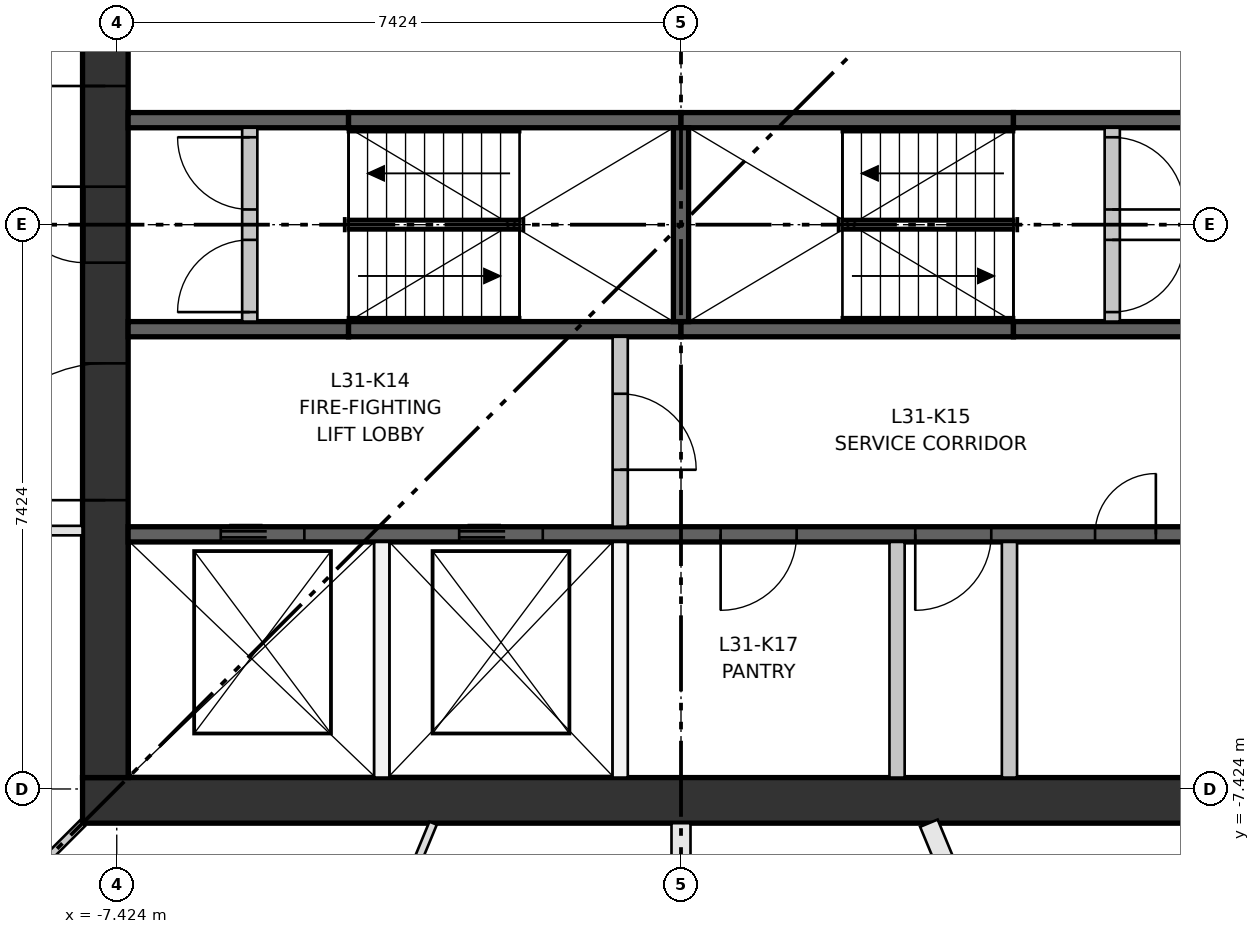
"""IFC4 building model, lengths in metres.
Left out: names, types, materials, properties, quantities, classifications, styles, units other than length and angle.
Written with IfcOpenShell. Run it as: python <this file> out.ifc"""

import sys

from ifc_helpers import new_model, si_unit, direction, frame, frame_2d, origin, place, context, subcontext, project, spatial, rectangle, extrude, element, fill, save


model = new_model("IFC4")
c1 = context("Model", 3, precision=1e-05, world=origin(), true_north=direction((0.0, 1.0)))
c2 = subcontext(c1, "Body", "Model", "MODEL_VIEW")
j1 = project(units=[si_unit("LENGTHUNIT", "METRE"), si_unit("PLANEANGLEUNIT", "RADIAN")], contexts=[c1])
p1 = place(None, origin())
s1 = spatial("IfcSite", under=j1, at=p1, CompositionType="ELEMENT")
p2 = place(p1, origin())
s2 = spatial("IfcBuilding", under=s1, at=p2, CompositionType="ELEMENT")
p3 = place(p2, frame((0.0, 0.0, 120.95)))
s3 = spatial("IfcBuildingStorey", under=s2, at=p3, CompositionType="ELEMENT", Elevation=120.95)
p4 = place(p3, frame((-7.874, -7.574, 0.0), z_axis=(0.0, 0.0, 1.0), x_axis=(1.0, 0.0, 0.0)))
e1 = element("IfcWall", 1, at=p4, inside=s3, PredefinedType="SHEAR", context=c2, shape_type="SweptSolid", body=[
    extrude(rectangle(XDim=15.748, YDim=0.6, at=frame_2d((7.874, 0.0))), origin(), (0.0, 0.0, 1.0), 3.35),
])
p5 = place(p3, frame((-7.574, -7.274, 0.0), z_axis=(0.0, 0.0, 1.0), x_axis=(0.0, 1.0, 0.0)))
e2 = element("IfcWall", 2, at=p5, inside=s3, PredefinedType="SHEAR", context=c2, shape_type="SweptSolid", body=[
    extrude(rectangle(XDim=14.548, YDim=0.6, at=frame_2d((7.274, 0.0))), origin(), (0.0, 0.0, 1.0), 3.35),
])
p6 = place(p5, frame((6.774, 0.0, 0.0)))
e3 = element("IfcOpeningElement", 3, at=p6, cuts=e2, PredefinedType="OPENING", context=c2, shape_type="SweptSolid", body=[
    extrude(rectangle(XDim=1.0, YDim=2.1, at=frame_2d((0.5, 1.05))), frame((0.0, 0.31, 0.0), z_axis=(0.0, -1.0, 0.0), x_axis=(1.0, 0.0, 0.0)), (0.0, 0.0, 1.0), 0.62),
])
p7 = place(p5, frame((3.649, 0.0, 0.0)))
e4 = element("IfcOpeningElement", 4, at=p7, cuts=e2, PredefinedType="OPENING", context=c2, shape_type="SweptSolid", body=[
    extrude(rectangle(XDim=1.8, YDim=2.1, at=frame_2d((0.9, 1.05))), frame((0.0, 0.31, 0.0), z_axis=(0.0, -1.0, 0.0), x_axis=(1.0, 0.0, 0.0)), (0.0, 0.0, 1.0), 0.62),
])
p8 = place(p5, frame((9.098, 0.0, 0.0)))
e5 = element("IfcOpeningElement", 5, at=p8, cuts=e2, PredefinedType="OPENING", context=c2, shape_type="SweptSolid", body=[
    extrude(rectangle(XDim=1.8, YDim=2.1, at=frame_2d((0.9, 1.05))), frame((0.0, 0.31, 0.0), z_axis=(0.0, -1.0, 0.0), x_axis=(1.0, 0.0, 0.0)), (0.0, 0.0, 1.0), 0.62),
])
p9 = place(p3, frame((-7.274, -4.074, 0.0), z_axis=(0.0, 0.0, 1.0), x_axis=(1.0, 0.0, 0.0)))
e6 = element("IfcWall", 6, at=p9, inside=s3, PredefinedType="SHEAR", context=c2, shape_type="SweptSolid", body=[
    extrude(rectangle(XDim=14.548, YDim=0.2, at=frame_2d((7.274, 0.0))), origin(), (0.0, 0.0, 1.0), 3.0),
])
p10 = place(p9, frame((1.219, 0.0, 0.0)))
e7 = element("IfcOpeningElement", 7, at=p10, cuts=e6, PredefinedType="OPENING", context=c2, shape_type="SweptSolid", body=[
    extrude(rectangle(XDim=1.1, YDim=2.1, at=frame_2d((0.55, 1.05))), frame((0.0, 0.11, 0.0), z_axis=(0.0, -1.0, 0.0), x_axis=(1.0, 0.0, 0.0)), (0.0, 0.0, 1.0), 0.22),
])
p11 = place(p9, frame((4.355, 0.0, 0.0)))
e8 = element("IfcOpeningElement", 8, at=p11, cuts=e6, PredefinedType="OPENING", context=c2, shape_type="SweptSolid", body=[
    extrude(rectangle(XDim=1.1, YDim=2.1, at=frame_2d((0.55, 1.05))), frame((0.0, 0.11, 0.0), z_axis=(0.0, -1.0, 0.0), x_axis=(1.0, 0.0, 0.0)), (0.0, 0.0, 1.0), 0.22),
])
p12 = place(p9, frame((7.795, 0.0, 0.0)))
e9 = element("IfcOpeningElement", 9, at=p12, cuts=e6, PredefinedType="OPENING", context=c2, shape_type="SweptSolid", body=[
    extrude(rectangle(XDim=1.0, YDim=2.1, at=frame_2d((0.5, 1.05))), frame((0.0, 0.11, 0.0), z_axis=(0.0, -1.0, 0.0), x_axis=(1.0, 0.0, 0.0)), (0.0, 0.0, 1.0), 0.22),
])
p13 = place(p9, frame((10.356, 0.0, 0.0)))
e10 = element("IfcOpeningElement", 10, at=p13, cuts=e6, PredefinedType="OPENING", context=c2, shape_type="SweptSolid", body=[
    extrude(rectangle(XDim=1.0, YDim=2.1, at=frame_2d((0.5, 1.05))), frame((0.0, 0.11, 0.0), z_axis=(0.0, -1.0, 0.0), x_axis=(1.0, 0.0, 0.0)), (0.0, 0.0, 1.0), 0.22),
])
p14 = place(p9, frame((12.722, 0.0, 0.0)))
e11 = element("IfcOpeningElement", 11, at=p14, cuts=e6, PredefinedType="OPENING", context=c2, shape_type="SweptSolid", body=[
    extrude(rectangle(XDim=0.8, YDim=2.1, at=frame_2d((0.4, 1.05))), frame((0.0, 0.11, 0.0), z_axis=(0.0, -1.0, 0.0), x_axis=(1.0, 0.0, 0.0)), (0.0, 0.0, 1.0), 0.22),
])
p15 = place(p3, frame((-7.274, -1.375, 0.0), z_axis=(0.0, 0.0, 1.0), x_axis=(1.0, 0.0, 0.0)))
e12 = element("IfcWall", 12, at=p15, inside=s3, PredefinedType="SHEAR", context=c2, shape_type="SweptSolid", body=[
    extrude(rectangle(XDim=2.9, YDim=0.2, at=frame_2d((1.45, 0.0))), origin(), (0.0, 0.0, 1.0), 3.0),
])
for number, where, z_axis, x_axis in (
    (13, (-4.374, -1.375, 0.0), (0.0, 0.0, 1.0), (1.0, 0.0, 0.0)),
    (14, (0.0, -1.375, 0.0), (0.0, 0.0, 1.0), (1.0, 0.0, 0.0)),
):
    element("IfcWall", number, at=place(p3, frame(where, z_axis=z_axis, x_axis=x_axis)), inside=s3, PredefinedType="SHEAR", context=c2, shape_type="SweptSolid", body=[
        extrude(rectangle(XDim=4.374, YDim=0.2, at=frame_2d((2.187, 0.0))), origin(), (0.0, 0.0, 1.0), 3.0),
    ])
for number, where, z_axis, x_axis in (
    (15, (4.374, -1.375, 0.0), (0.0, 0.0, 1.0), (1.0, 0.0, 0.0)),
    (16, (-7.274, 1.375, 0.0), (0.0, 0.0, 1.0), (1.0, 0.0, 0.0)),
):
    element("IfcWall", number, at=place(p3, frame(where, z_axis=z_axis, x_axis=x_axis)), inside=s3, PredefinedType="SHEAR", context=c2, shape_type="SweptSolid", body=[
        extrude(rectangle(XDim=2.9, YDim=0.2, at=frame_2d((1.45, 0.0))), origin(), (0.0, 0.0, 1.0), 3.0),
    ])
for number, where, z_axis, x_axis in (
    (17, (-4.374, 1.375, 0.0), (0.0, 0.0, 1.0), (1.0, 0.0, 0.0)),
    (18, (0.0, 1.375, 0.0), (0.0, 0.0, 1.0), (1.0, 0.0, 0.0)),
):
    element("IfcWall", number, at=place(p3, frame(where, z_axis=z_axis, x_axis=x_axis)), inside=s3, PredefinedType="SHEAR", context=c2, shape_type="SweptSolid", body=[
        extrude(rectangle(XDim=4.374, YDim=0.2, at=frame_2d((2.187, 0.0))), origin(), (0.0, 0.0, 1.0), 3.0),
    ])
p16 = place(p3, frame((4.374, 1.375, 0.0), z_axis=(0.0, 0.0, 1.0), x_axis=(1.0, 0.0, 0.0)))
e19 = element("IfcWall", 19, at=p16, inside=s3, PredefinedType="SHEAR", context=c2, shape_type="SweptSolid", body=[
    extrude(rectangle(XDim=2.9, YDim=0.2, at=frame_2d((1.45, 0.0))), origin(), (0.0, 0.0, 1.0), 3.0),
])
p17 = place(p3, frame((0.0, -1.275, 0.0), z_axis=(0.0, 0.0, 1.0), x_axis=(0.0, 1.0, 0.0)))
e20 = element("IfcWall", 20, at=p17, inside=s3, PredefinedType="SHEAR", context=c2, shape_type="SweptSolid", body=[
    extrude(rectangle(XDim=2.55, YDim=0.2, at=frame_2d((1.275, 0.0))), origin(), (0.0, 0.0, 1.0), 3.0),
])
for number, where, z_axis, x_axis in (
    (21, (-3.937, -7.274, 0.0), (0.0, 0.0, 1.0), (0.0, 1.0, 0.0)),
    (22, (-0.8, -7.274, 0.0), (0.0, 0.0, 1.0), (0.0, 1.0, 0.0)),
):
    element("IfcWall", number, at=place(p3, frame(where, z_axis=z_axis, x_axis=x_axis)), inside=s3, PredefinedType="PARTITIONING", context=c2, shape_type="SweptSolid", body=[
        extrude(rectangle(XDim=3.1, YDim=0.2, at=frame_2d((1.55, 0.0))), origin(), (0.0, 0.0, 1.0), 3.0),
    ])
p18 = place(p3, frame((-0.8, -3.974, 0.0), z_axis=(0.0, 0.0, 1.0), x_axis=(0.0, 1.0, 0.0)))
e23 = element("IfcWall", 23, at=p18, inside=s3, PredefinedType="PARTITIONING", context=c2, shape_type="SweptSolid", body=[
    extrude(rectangle(XDim=2.499, YDim=0.2, at=frame_2d((1.25, 0.0))), origin(), (0.0, 0.0, 1.0), 3.0),
])
p19 = place(p18, frame((0.75, 0.0, 0.0)))
e24 = element("IfcOpeningElement", 24, at=p19, cuts=e23, PredefinedType="OPENING", context=c2, shape_type="SweptSolid", body=[
    extrude(rectangle(XDim=1.0, YDim=2.1, at=frame_2d((0.5, 1.05))), frame((0.0, 0.11, 0.0), z_axis=(0.0, -1.0, 0.0), x_axis=(1.0, 0.0, 0.0)), (0.0, 0.0, 1.0), 0.22),
])
for number, where, z_axis, x_axis in (
    (25, (2.843, -7.274, 0.0), (0.0, 0.0, 1.0), (0.0, 1.0, 0.0)),
    (26, (4.322, -7.274, 0.0), (0.0, 0.0, 1.0), (0.0, 1.0, 0.0)),
):
    element("IfcWall", number, at=place(p3, frame(where, z_axis=z_axis, x_axis=x_axis)), inside=s3, PredefinedType="PARTITIONING", context=c2, shape_type="SweptSolid", body=[
        extrude(rectangle(XDim=3.1, YDim=0.2, at=frame_2d((1.55, 0.0))), origin(), (0.0, 0.0, 1.0), 3.0),
    ])
p20 = place(p3, frame((-5.674, -1.275, 0.0), z_axis=(0.0, 0.0, 1.0), x_axis=(0.0, 1.0, 0.0)))
e27 = element("IfcWall", 27, at=p20, inside=s3, PredefinedType="PARTITIONING", context=c2, shape_type="SweptSolid", body=[
    extrude(rectangle(XDim=2.55, YDim=0.2, at=frame_2d((1.275, 0.0))), origin(), (0.0, 0.0, 1.0), 3.0),
])
p21 = place(p20, frame((0.125, 0.0, 0.0)))
e28 = element("IfcOpeningElement", 28, at=p21, cuts=e27, PredefinedType="OPENING", context=c2, shape_type="SweptSolid", body=[
    extrude(rectangle(XDim=0.95, YDim=2.1, at=frame_2d((0.475, 1.05))), frame((0.0, 0.11, 0.0), z_axis=(0.0, -1.0, 0.0), x_axis=(1.0, 0.0, 0.0)), (0.0, 0.0, 1.0), 0.22),
])
p22 = place(p20, frame((1.475, 0.0, 0.0)))
e29 = element("IfcOpeningElement", 29, at=p22, cuts=e27, PredefinedType="OPENING", context=c2, shape_type="SweptSolid", body=[
    extrude(rectangle(XDim=0.95, YDim=2.1, at=frame_2d((0.475, 1.05))), frame((0.0, 0.11, 0.0), z_axis=(0.0, -1.0, 0.0), x_axis=(1.0, 0.0, 0.0)), (0.0, 0.0, 1.0), 0.22),
])
p23 = place(p3, frame((5.674, -1.275, 0.0), z_axis=(0.0, 0.0, 1.0), x_axis=(0.0, 1.0, 0.0)))
e30 = element("IfcWall", 30, at=p23, inside=s3, PredefinedType="PARTITIONING", context=c2, shape_type="SweptSolid", body=[
    extrude(rectangle(XDim=2.55, YDim=0.2, at=frame_2d((1.275, 0.0))), origin(), (0.0, 0.0, 1.0), 3.0),
])
p24 = place(p23, frame((0.125, 0.0, 0.0)))
e31 = element("IfcOpeningElement", 31, at=p24, cuts=e30, PredefinedType="OPENING", context=c2, shape_type="SweptSolid", body=[
    extrude(rectangle(XDim=0.95, YDim=2.1, at=frame_2d((0.475, 1.05))), frame((0.0, 0.11, 0.0), z_axis=(0.0, -1.0, 0.0), x_axis=(1.0, 0.0, 0.0)), (0.0, 0.0, 1.0), 0.22),
])
p25 = place(p23, frame((1.475, 0.0, 0.0)))
e32 = element("IfcOpeningElement", 32, at=p25, cuts=e30, PredefinedType="OPENING", context=c2, shape_type="SweptSolid", body=[
    extrude(rectangle(XDim=0.95, YDim=2.1, at=frame_2d((0.475, 1.05))), frame((0.0, 0.11, 0.0), z_axis=(0.0, -1.0, 0.0), x_axis=(1.0, 0.0, 0.0)), (0.0, 0.0, 1.0), 0.22),
])
p26 = place(p3, frame((-7.874, -4.024, 0.0), z_axis=(0.0, 0.0, 1.0), x_axis=(-1.0, 0.0, 0.0)))
e33 = element("IfcWall", 33, at=p26, inside=s3, PredefinedType="PARTITIONING", context=c2, shape_type="SweptSolid", body=[
    extrude(rectangle(XDim=5.91, YDim=0.125, at=frame_2d((2.955, 0.0))), origin(), (0.0, 0.0, 1.0), 3.0),
])
p27 = place(p26, frame((2.5, 0.0, 0.0)))
e34 = element("IfcOpeningElement", 34, at=p27, cuts=e33, PredefinedType="OPENING", context=c2, shape_type="SweptSolid", body=[
    extrude(rectangle(XDim=1.0, YDim=2.1, at=frame_2d((0.5, 1.05))), frame((0.0, 0.073, 0.0), z_axis=(0.0, -1.0, 0.0), x_axis=(1.0, 0.0, 0.0)), (0.0, 0.0, 1.0), 0.145),
])
p28 = place(p3, frame((-7.874, -7.874, 0.0), z_axis=(0.0, 0.0, 1.0), x_axis=(-0.707106781187, -0.707106781187, 0.0)))
e35 = element("IfcWall", 35, at=p28, inside=s3, PredefinedType="PARTITIONING", context=c2, shape_type="SweptSolid", body=[
    extrude(rectangle(XDim=6.794, YDim=0.1, at=frame_2d((3.397, 0.0))), origin(), (0.0, 0.0, 1.0), 3.0),
])
p29 = place(p28, frame((2.8, 0.0, 0.0)))
e36 = element("IfcOpeningElement", 36, at=p29, cuts=e35, PredefinedType="OPENING", context=c2, shape_type="SweptSolid", body=[
    extrude(rectangle(XDim=1.0, YDim=2.1, at=frame_2d((0.5, 1.05))), frame((0.0, 0.06, 0.0), z_axis=(0.0, -1.0, 0.0), x_axis=(1.0, 0.0, 0.0)), (0.0, 0.0, 1.0), 0.12),
])
p30 = place(p3, frame((-3.261, -7.874, 0.0), z_axis=(0.0, 0.0, 1.0), x_axis=(-0.382671840259, -0.923884334034, 0.0)))
e37 = element("IfcWall", 37, at=p30, inside=s3, PredefinedType="PARTITIONING", context=c2, shape_type="SweptSolid", body=[
    extrude(rectangle(XDim=6.737, YDim=0.105, at=frame_2d((3.369, 0.0))), origin(), (0.0, 0.0, 1.0), 3.0),
])
p31 = place(p3, frame((0.0, -7.874, 0.0), z_axis=(0.0, 0.0, 1.0), x_axis=(0.0, -1.0, 0.0)))
e38 = element("IfcWall", 38, at=p31, inside=s3, PredefinedType="PARTITIONING", context=c2, shape_type="SweptSolid", body=[
    extrude(rectangle(XDim=7.255, YDim=0.25, at=frame_2d((3.627, 0.0))), origin(), (0.0, 0.0, 1.0), 3.0),
])
p32 = place(p3, frame((5.84, -14.098, 0.0), z_axis=(0.0, 0.0, 1.0), x_axis=(-0.382671840259, 0.923884334034, 0.0)))
e39 = element("IfcWall", 39, at=p32, inside=s3, PredefinedType="PARTITIONING", context=c2, shape_type="SweptSolid", body=[
    extrude(rectangle(XDim=6.737, YDim=0.25, at=frame_2d((3.369, 0.0))), origin(), (0.0, 0.0, 1.0), 3.0),
])
p33 = place(p32, frame((2.9, 0.0, 0.0)))
e40 = element("IfcOpeningElement", 40, at=p33, cuts=e39, PredefinedType="OPENING", context=c2, shape_type="SweptSolid", body=[
    extrude(rectangle(XDim=1.0, YDim=2.1, at=frame_2d((0.5, 1.05))), frame((0.0, 0.135, 0.0), z_axis=(0.0, -1.0, 0.0), x_axis=(1.0, 0.0, 0.0)), (0.0, 0.0, 1.0), 0.27),
])
p34 = place(p10, origin())
e41 = element("IfcDoor", 41, at=p34, inside=s3, OperationType="DOUBLE_DOOR_SLIDING", PredefinedType="DOOR", context=c2, shape_type="SweptSolid", body=[
    extrude(rectangle(XDim=1.1, YDim=2.1, at=frame_2d((0.55, 1.05))), frame((0.0, 0.025, 0.0), z_axis=(0.0, -1.0, 0.0), x_axis=(1.0, 0.0, 0.0)), (0.0, 0.0, 1.0), 0.05),
])
fill(e7, e41)
p35 = place(p11, origin())
e42 = element("IfcDoor", 42, at=p35, inside=s3, OperationType="DOUBLE_DOOR_SLIDING", PredefinedType="DOOR", context=c2, shape_type="SweptSolid", body=[
    extrude(rectangle(XDim=1.1, YDim=2.1, at=frame_2d((0.55, 1.05))), frame((0.0, 0.025, 0.0), z_axis=(0.0, -1.0, 0.0), x_axis=(1.0, 0.0, 0.0)), (0.0, 0.0, 1.0), 0.05),
])
fill(e8, e42)
p36 = place(p21, origin())
e43 = element("IfcDoor", 43, at=p36, inside=s3, OperationType="SINGLE_SWING_LEFT", PredefinedType="DOOR", context=c2, shape_type="SweptSolid", body=[
    extrude(rectangle(XDim=0.95, YDim=2.1, at=frame_2d((0.475, 1.05))), frame((0.0, 0.025, 0.0), z_axis=(0.0, -1.0, 0.0), x_axis=(1.0, 0.0, 0.0)), (0.0, 0.0, 1.0), 0.05),
])
fill(e28, e43)
p37 = place(p22, origin())
e44 = element("IfcDoor", 44, at=p37, inside=s3, OperationType="SINGLE_SWING_RIGHT", PredefinedType="DOOR", context=c2, shape_type="SweptSolid", body=[
    extrude(rectangle(XDim=0.95, YDim=2.1, at=frame_2d((0.475, 1.05))), frame((0.0, 0.025, 0.0), z_axis=(0.0, -1.0, 0.0), x_axis=(1.0, 0.0, 0.0)), (0.0, 0.0, 1.0), 0.05),
])
fill(e29, e44)
p38 = place(p24, frame((0.95, 0.0, 0.0), z_axis=(0.0, 0.0, 1.0), x_axis=(-1.0, 0.0, 0.0)))
e45 = element("IfcDoor", 45, at=p38, inside=s3, OperationType="SINGLE_SWING_RIGHT", PredefinedType="DOOR", context=c2, shape_type="SweptSolid", body=[
    extrude(rectangle(XDim=0.95, YDim=2.1, at=frame_2d((0.475, 1.05))), frame((0.0, 0.025, 0.0), z_axis=(0.0, -1.0, 0.0), x_axis=(1.0, 0.0, 0.0)), (0.0, 0.0, 1.0), 0.05),
])
fill(e31, e45)
p39 = place(p25, frame((0.95, 0.0, 0.0), z_axis=(0.0, 0.0, 1.0), x_axis=(-1.0, 0.0, 0.0)))
e46 = element("IfcDoor", 46, at=p39, inside=s3, OperationType="SINGLE_SWING_LEFT", PredefinedType="DOOR", context=c2, shape_type="SweptSolid", body=[
    extrude(rectangle(XDim=0.95, YDim=2.1, at=frame_2d((0.475, 1.05))), frame((0.0, 0.025, 0.0), z_axis=(0.0, -1.0, 0.0), x_axis=(1.0, 0.0, 0.0)), (0.0, 0.0, 1.0), 0.05),
])
fill(e32, e46)
p40 = place(p19, frame((1.0, 0.0, 0.0), z_axis=(0.0, 0.0, 1.0), x_axis=(-1.0, 0.0, 0.0)))
e47 = element("IfcDoor", 47, at=p40, inside=s3, OperationType="SINGLE_SWING_LEFT", PredefinedType="DOOR", context=c2, shape_type="SweptSolid", body=[
    extrude(rectangle(XDim=1.0, YDim=2.1, at=frame_2d((0.5, 1.05))), frame((0.0, 0.025, 0.0), z_axis=(0.0, -1.0, 0.0), x_axis=(1.0, 0.0, 0.0)), (0.0, 0.0, 1.0), 0.05),
])
fill(e24, e47)
p41 = place(p12, frame((1.0, 0.0, 0.0), z_axis=(0.0, 0.0, 1.0), x_axis=(-1.0, 0.0, 0.0)))
e48 = element("IfcDoor", 48, at=p41, inside=s3, OperationType="SINGLE_SWING_LEFT", PredefinedType="DOOR", context=c2, shape_type="SweptSolid", body=[
    extrude(rectangle(XDim=1.0, YDim=2.1, at=frame_2d((0.5, 1.05))), frame((0.0, 0.025, 0.0), z_axis=(0.0, -1.0, 0.0), x_axis=(1.0, 0.0, 0.0)), (0.0, 0.0, 1.0), 0.05),
])
fill(e9, e48)
p42 = place(p13, frame((1.0, 0.0, 0.0), z_axis=(0.0, 0.0, 1.0), x_axis=(-1.0, 0.0, 0.0)))
e49 = element("IfcDoor", 49, at=p42, inside=s3, OperationType="SINGLE_SWING_LEFT", PredefinedType="DOOR", context=c2, shape_type="SweptSolid", body=[
    extrude(rectangle(XDim=1.0, YDim=2.1, at=frame_2d((0.5, 1.05))), frame((0.0, 0.025, 0.0), z_axis=(0.0, -1.0, 0.0), x_axis=(1.0, 0.0, 0.0)), (0.0, 0.0, 1.0), 0.05),
])
fill(e10, e49)
p43 = place(p14, origin())
e50 = element("IfcDoor", 50, at=p43, inside=s3, OperationType="SINGLE_SWING_RIGHT", PredefinedType="DOOR", context=c2, shape_type="SweptSolid", body=[
    extrude(rectangle(XDim=0.8, YDim=2.1, at=frame_2d((0.4, 1.05))), frame((0.0, 0.025, 0.0), z_axis=(0.0, -1.0, 0.0), x_axis=(1.0, 0.0, 0.0)), (0.0, 0.0, 1.0), 0.05),
])
fill(e11, e50)
p44 = place(p6, origin())
e51 = element("IfcDoor", 51, at=p44, inside=s3, OperationType="SINGLE_SWING_RIGHT", PredefinedType="DOOR", context=c2, shape_type="SweptSolid", body=[
    extrude(rectangle(XDim=1.0, YDim=2.1, at=frame_2d((0.5, 1.05))), frame((0.0, 0.3, 0.0), z_axis=(0.0, -1.0, 0.0), x_axis=(1.0, 0.0, 0.0)), (0.0, 0.0, 1.0), 0.05),
])
fill(e3, e51)
p45 = place(p7, origin())
e52 = element("IfcDoor", 52, at=p45, inside=s3, OperationType="DOUBLE_DOOR_SINGLE_SWING", PredefinedType="DOOR", context=c2, shape_type="SweptSolid", body=[
    extrude(rectangle(XDim=1.8, YDim=2.1, at=frame_2d((0.9, 1.05))), frame((0.0, 0.025, 0.0), z_axis=(0.0, -1.0, 0.0), x_axis=(1.0, 0.0, 0.0)), (0.0, 0.0, 1.0), 0.05),
])
fill(e4, e52)
p46 = place(p8, origin())
e53 = element("IfcDoor", 53, at=p46, inside=s3, OperationType="DOUBLE_DOOR_SINGLE_SWING", PredefinedType="DOOR", context=c2, shape_type="SweptSolid", body=[
    extrude(rectangle(XDim=1.8, YDim=2.1, at=frame_2d((0.9, 1.05))), frame((0.0, 0.025, 0.0), z_axis=(0.0, -1.0, 0.0), x_axis=(1.0, 0.0, 0.0)), (0.0, 0.0, 1.0), 0.05),
])
fill(e5, e53)
save(model, sys.argv[1])
